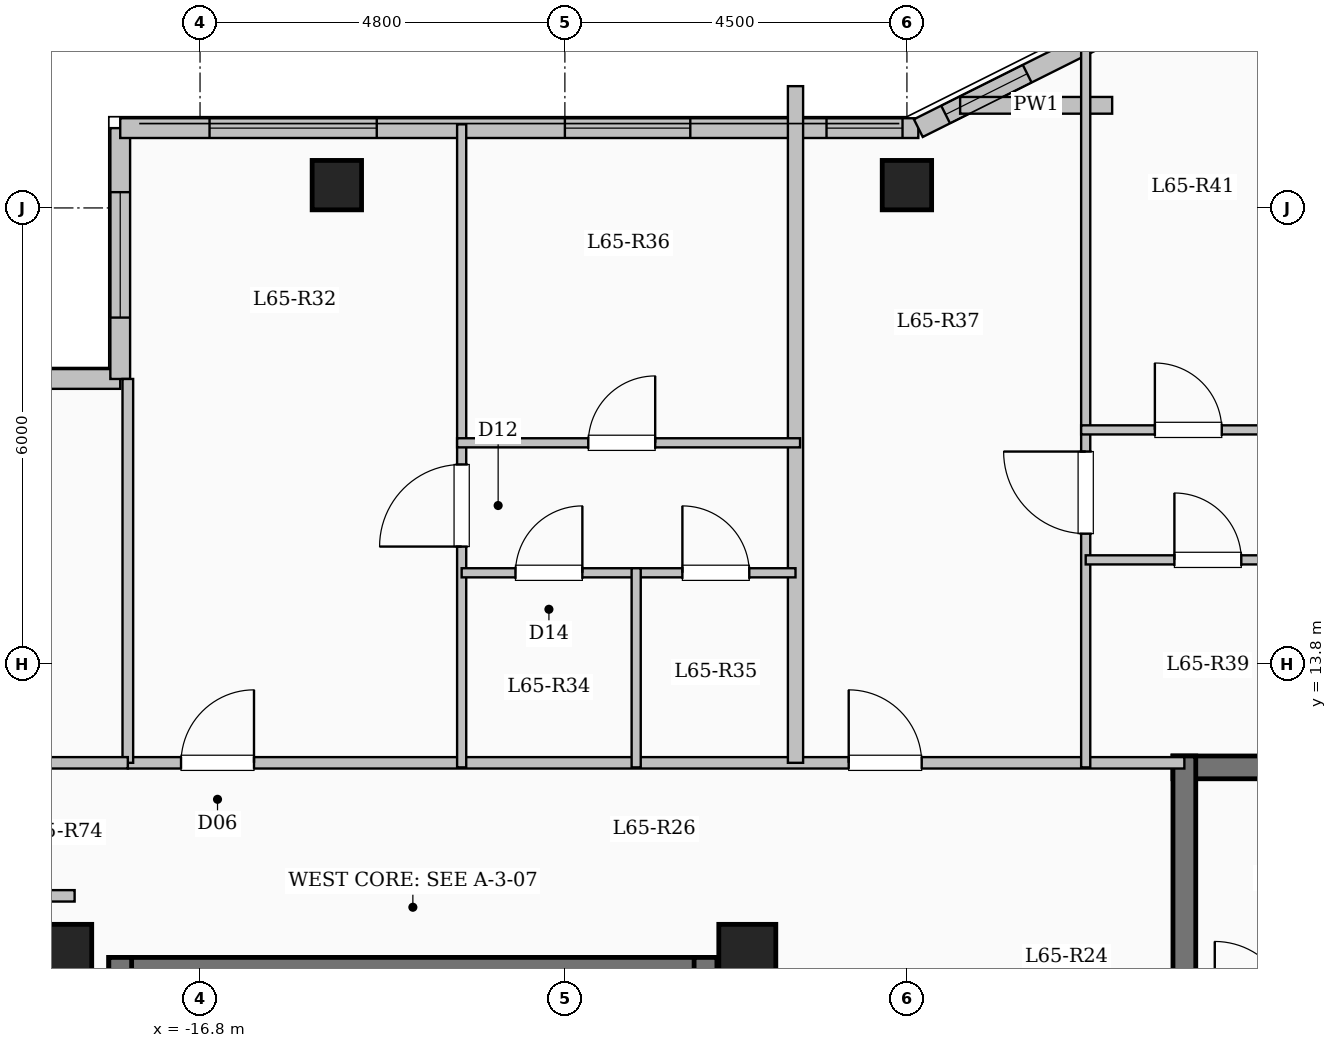
"""IFC4 building model, lengths in metres.
Left out: names, types, materials, properties, quantities, classifications, styles, units other than length and angle.
Written with IfcOpenShell. Run it as: python <this file> out.ifc"""

import sys

from ifc_helpers import new_model, si_unit, direction, frame, frame_2d, origin, origin_2d, place, context, subcontext, project, spatial, rectangle, extrude, element, fill, save


model = new_model("IFC4")
c1 = context("Model", 3, precision=1e-05, world=origin(), true_north=direction((0.0, 1.0)))
c2 = subcontext(c1, "Body", "Model", "MODEL_VIEW")
j1 = project(units=[si_unit("LENGTHUNIT", "METRE"), si_unit("PLANEANGLEUNIT", "RADIAN")], contexts=[c1])
p1 = place(None, origin())
s1 = spatial("IfcSite", under=j1, at=p1, CompositionType="ELEMENT")
p2 = place(p1, origin())
s2 = spatial("IfcBuilding", under=s1, at=p2, CompositionType="ELEMENT")
p3 = place(p2, frame((0.0, 0.0, 241.5)))
s3 = spatial("IfcBuildingStorey", under=s2, at=p3, CompositionType="ELEMENT", Elevation=241.5)
for number, where, z_axis, x_axis in (
    (1, (-9.6, 10.0, 0.0), (0.0, 0.0, 1.0), (1.0, 0.0, 0.0)),
    (2, (-18.6, 10.0, 0.0), (0.0, 0.0, 1.0), (1.0, 0.0, 0.0)),
):
    element("IfcColumn", number, at=place(p3, frame(where, z_axis=z_axis, x_axis=x_axis)), inside=s3, PredefinedType="COLUMN", context=c2, shape_type="SweptSolid", body=[
        extrude(rectangle(XDim=0.75, YDim=0.75, at=origin_2d()), origin(), (0.0, 0.0, 1.0), 3.35),
    ])
for number, where, z_axis, x_axis in (
    (3, (-15.0, 20.1, 0.0), (0.0, 0.0, 1.0), (1.0, 0.0, 0.0)),
    (4, (-7.5, 20.1, 0.0), (0.0, 0.0, 1.0), (1.0, 0.0, 0.0)),
):
    element("IfcColumn", number, at=place(p3, frame(where, z_axis=z_axis, x_axis=x_axis)), inside=s3, PredefinedType="COLUMN", context=c2, shape_type="SweptSolid", body=[
        extrude(rectangle(XDim=0.65, YDim=0.65, at=origin_2d()), origin(), (0.0, 0.0, 1.0), 3.35),
    ])
p4 = place(p3, frame((-22.65, 17.55, 0.0), z_axis=(0.0, 0.0, 1.0), x_axis=(1.0, 0.0, 0.0)))
e5 = element("IfcWall", 5, at=p4, inside=s3, PredefinedType="SOLIDWALL", context=c2, shape_type="SweptSolid", body=[
    extrude(rectangle(XDim=4.8, YDim=0.26, at=frame_2d((2.4, 0.0))), origin(), (0.0, 0.0, 1.0), 3.1),
])
p5 = place(p4, frame((1.425, 0.0, 0.9)))
e6 = element("IfcOpeningElement", 6, at=p5, cuts=e5, PredefinedType="OPENING", context=c2, shape_type="SweptSolid", body=[
    extrude(rectangle(XDim=2.0, YDim=1.7, at=frame_2d((1.0, 0.85))), frame((0.0, 0.14, 0.0), z_axis=(0.0, -1.0, 0.0), x_axis=(1.0, 0.0, 0.0)), (0.0, 0.0, 1.0), 0.28),
])
p6 = place(p3, frame((-17.85, 17.55, 0.0), z_axis=(0.0, 0.0, 1.0), x_axis=(0.0, 1.0, 0.0)))
e7 = element("IfcWall", 7, at=p6, inside=s3, PredefinedType="SOLIDWALL", context=c2, shape_type="SweptSolid", body=[
    extrude(rectangle(XDim=3.3, YDim=0.26, at=frame_2d((1.65, 0.0))), origin(), (0.0, 0.0, 1.0), 3.1),
])
p7 = place(p6, frame((0.808, 0.0, 0.9)))
e8 = element("IfcOpeningElement", 8, at=p7, cuts=e7, PredefinedType="OPENING", context=c2, shape_type="SweptSolid", body=[
    extrude(rectangle(XDim=1.65, YDim=1.6, at=frame_2d((0.825, 0.8))), frame((0.0, 0.14, 0.0), z_axis=(0.0, -1.0, 0.0), x_axis=(1.0, 0.0, 0.0)), (0.0, 0.0, 1.0), 0.28),
])
p8 = place(p3, frame((-17.85, 20.85, 0.0), z_axis=(0.0, 0.0, 1.0), x_axis=(1.0, 0.0, 0.0)))
e9 = element("IfcWall", 9, at=p8, inside=s3, PredefinedType="SOLIDWALL", context=c2, shape_type="SweptSolid", body=[
    extrude(rectangle(XDim=10.5, YDim=0.26, at=frame_2d((5.25, 0.0))), origin(), (0.0, 0.0, 1.0), 3.1),
])
p9 = place(p8, frame((1.175, 0.0, 0.9)))
e10 = element("IfcOpeningElement", 10, at=p9, cuts=e9, PredefinedType="OPENING", context=c2, shape_type="SweptSolid", body=[
    extrude(rectangle(XDim=2.2, YDim=1.75, at=frame_2d((1.1, 0.875))), frame((0.0, 0.14, 0.0), z_axis=(0.0, -1.0, 0.0), x_axis=(1.0, 0.0, 0.0)), (0.0, 0.0, 1.0), 0.28),
])
p10 = place(p8, frame((5.85, 0.0, 0.9)))
e11 = element("IfcOpeningElement", 11, at=p10, cuts=e9, PredefinedType="OPENING", context=c2, shape_type="SweptSolid", body=[
    extrude(rectangle(XDim=1.65, YDim=1.6, at=frame_2d((0.825, 0.8))), frame((0.0, 0.14, 0.0), z_axis=(0.0, -1.0, 0.0), x_axis=(1.0, 0.0, 0.0)), (0.0, 0.0, 1.0), 0.28),
])
p11 = place(p8, frame((9.292, 0.0, 0.95)))
e12 = element("IfcOpeningElement", 12, at=p11, cuts=e9, PredefinedType="OPENING", context=c2, shape_type="SweptSolid", body=[
    extrude(rectangle(XDim=1.0, YDim=1.5, at=frame_2d((0.5, 0.75))), frame((0.0, 0.14, 0.0), z_axis=(0.0, -1.0, 0.0), x_axis=(1.0, 0.0, 0.0)), (0.0, 0.0, 1.0), 0.28),
])
p12 = place(p3, frame((-7.35, 20.85, 0.0), z_axis=(0.0, 0.0, 1.0), x_axis=(0.894427191, 0.4472135955, 0.0)))
e13 = element("IfcWall", 13, at=p12, inside=s3, PredefinedType="SOLIDWALL", context=c2, shape_type="SweptSolid", body=[
    extrude(rectangle(XDim=3.354, YDim=0.26, at=frame_2d((1.677, 0.0))), origin(), (0.0, 0.0, 1.0), 3.1),
])
p13 = place(p12, frame((0.401, 0.0, 0.95)))
e14 = element("IfcOpeningElement", 14, at=p13, cuts=e13, PredefinedType="OPENING", context=c2, shape_type="SweptSolid", body=[
    extrude(rectangle(XDim=1.2, YDim=1.5, at=frame_2d((0.6, 0.75))), frame((0.0, 0.14, 0.0), z_axis=(0.0, -1.0, 0.0), x_axis=(1.0, 0.0, 0.0)), (0.0, 0.0, 1.0), 0.28),
])
p14 = place(p3, frame((-6.8, 21.15, 0.0), z_axis=(0.0, 0.0, 1.0), x_axis=(1.0, 0.0, 0.0)))
e15 = element("IfcWall", 15, at=p14, inside=s3, PredefinedType="PARAPET", context=c2, shape_type="SweptSolid", body=[
    extrude(rectangle(XDim=2.0, YDim=0.22, at=frame_2d((1.0, 0.0))), origin(), (0.0, 0.0, 1.0), 0.85),
])
p15 = place(p3, frame((-18.0, 9.79, 0.0), z_axis=(0.0, 0.0, 1.0), x_axis=(1.0, 0.0, 0.0)))
e16 = element("IfcWall", 16, at=p15, inside=s3, PredefinedType="SHEAR", context=c2, shape_type="SweptSolid", body=[
    extrude(rectangle(XDim=8.0, YDim=0.3, at=frame_2d((4.0, 0.0))), origin(), (0.0, 0.0, 1.0), 3.35),
])
for number, where, z_axis, x_axis in (
    (17, (-17.85, 6.35, 0.0), (0.0, 0.0, 1.0), (0.0, 1.0, 0.0)),
    (18, (-10.15, 6.35, 0.0), (0.0, 0.0, 1.0), (0.0, 1.0, 0.0)),
):
    element("IfcWall", number, at=place(p3, frame(where, z_axis=z_axis, x_axis=x_axis)), inside=s3, PredefinedType="SHEAR", context=c2, shape_type="SweptSolid", body=[
        extrude(rectangle(XDim=3.59, YDim=0.3, at=frame_2d((1.795, 0.0))), origin(), (0.0, 0.0, 1.0), 3.35),
    ])
p16 = place(p3, frame((-4.0, 12.44, 0.0), z_axis=(0.0, 0.0, 1.0), x_axis=(1.0, 0.0, 0.0)))
e19 = element("IfcWall", 19, at=p16, inside=s3, PredefinedType="SHEAR", context=c2, shape_type="SweptSolid", body=[
    extrude(rectangle(XDim=8.0, YDim=0.3, at=frame_2d((4.0, 0.0))), origin(), (0.0, 0.0, 1.0), 3.35),
])
p17 = place(p3, frame((-3.85, 9.0, 0.0), z_axis=(0.0, 0.0, 1.0), x_axis=(0.0, 1.0, 0.0)))
e20 = element("IfcWall", 20, at=p17, inside=s3, PredefinedType="SHEAR", context=c2, shape_type="SweptSolid", body=[
    extrude(rectangle(XDim=3.59, YDim=0.3, at=frame_2d((1.795, 0.0))), origin(), (0.0, 0.0, 1.0), 3.35),
])
p18 = place(p3, frame((-17.75, 12.5, 0.0), z_axis=(0.0, 0.0, 1.0), x_axis=(1.0, 0.0, 0.0)))
e21 = element("IfcWall", 21, at=p18, inside=s3, PredefinedType="PARTITIONING", context=c2, shape_type="SweptSolid", body=[
    extrude(rectangle(XDim=13.9, YDim=0.15, at=frame_2d((6.95, 0.0))), origin(), (0.0, 0.0, 1.0), 3.1),
])
p19 = place(p18, frame((0.7, 0.0, 0.0)))
e22 = element("IfcOpeningElement", 22, at=p19, cuts=e21, PredefinedType="OPENING", context=c2, shape_type="SweptSolid", body=[
    extrude(rectangle(XDim=0.96, YDim=2.15, at=frame_2d((0.48, 1.075))), frame((0.0, 0.085, 0.0), z_axis=(0.0, -1.0, 0.0), x_axis=(1.0, 0.0, 0.0)), (0.0, 0.0, 1.0), 0.17),
])
p20 = place(p18, frame((9.484, 0.0, 0.0)))
e23 = element("IfcOpeningElement", 23, at=p20, cuts=e21, PredefinedType="OPENING", context=c2, shape_type="SweptSolid", body=[
    extrude(rectangle(XDim=0.96, YDim=2.15, at=frame_2d((0.48, 1.075))), frame((0.0, 0.085, 0.0), z_axis=(0.0, -1.0, 0.0), x_axis=(1.0, 0.0, 0.0)), (0.0, 0.0, 1.0), 0.17),
])
p21 = place(p3, frame((-8.966, 12.5, 0.0), z_axis=(0.0, 0.0, 1.0), x_axis=(0.0, 1.0, 0.0)))
e24 = element("IfcWall", 24, at=p21, inside=s3, PredefinedType="SOLIDWALL", context=c2, shape_type="SweptSolid", body=[
    extrude(rectangle(XDim=8.902, YDim=0.2, at=frame_2d((4.451, 0.0))), origin(), (0.0, 0.0, 1.0), 3.1),
])
p22 = place(p3, frame((-13.358, 12.44, 0.0), z_axis=(0.0, 0.0, 1.0), x_axis=(0.0, 1.0, 0.0)))
e25 = element("IfcWall", 25, at=p22, inside=s3, PredefinedType="PARTITIONING", context=c2, shape_type="SweptSolid", body=[
    extrude(rectangle(XDim=8.46, YDim=0.12, at=frame_2d((4.23, 0.0))), origin(), (0.0, 0.0, 1.0), 3.1),
])
p23 = place(p22, frame((2.905, 0.0, 0.0)))
e26 = element("IfcOpeningElement", 26, at=p23, cuts=e25, PredefinedType="OPENING", context=c2, shape_type="SweptSolid", body=[
    extrude(rectangle(XDim=1.08, YDim=2.15, at=frame_2d((0.54, 1.075))), frame((0.0, 0.07, 0.0), z_axis=(0.0, -1.0, 0.0), x_axis=(1.0, 0.0, 0.0)), (0.0, 0.0, 1.0), 0.14),
])
p24 = place(p3, frame((-13.358, 15.0, 0.0), z_axis=(0.0, 0.0, 1.0), x_axis=(1.0, 0.0, 0.0)))
e27 = element("IfcWall", 27, at=p24, inside=s3, PredefinedType="PARTITIONING", context=c2, shape_type="SweptSolid", body=[
    extrude(rectangle(XDim=2.296, YDim=0.12, at=frame_2d((1.148, 0.0))), origin(), (0.0, 0.0, 1.0), 3.1),
])
p25 = place(p24, frame((0.708, 0.0, 0.0)))
e28 = element("IfcOpeningElement", 28, at=p25, cuts=e27, PredefinedType="OPENING", context=c2, shape_type="SweptSolid", body=[
    extrude(rectangle(XDim=0.88, YDim=2.1, at=frame_2d((0.44, 1.05))), frame((0.0, 0.07, 0.0), z_axis=(0.0, -1.0, 0.0), x_axis=(1.0, 0.0, 0.0)), (0.0, 0.0, 1.0), 0.14),
])
p26 = place(p3, frame((-11.062, 15.0, 0.0), z_axis=(0.0, 0.0, 1.0), x_axis=(1.0, 0.0, 0.0)))
e29 = element("IfcWall", 29, at=p26, inside=s3, PredefinedType="PARTITIONING", context=c2, shape_type="SweptSolid", body=[
    extrude(rectangle(XDim=2.096, YDim=0.12, at=frame_2d((1.048, 0.0))), origin(), (0.0, 0.0, 1.0), 3.1),
])
p27 = place(p26, frame((0.608, 0.0, 0.0)))
e30 = element("IfcOpeningElement", 30, at=p27, cuts=e29, PredefinedType="OPENING", context=c2, shape_type="SweptSolid", body=[
    extrude(rectangle(XDim=0.88, YDim=2.1, at=frame_2d((0.44, 1.05))), frame((0.0, 0.07, 0.0), z_axis=(0.0, -1.0, 0.0), x_axis=(1.0, 0.0, 0.0)), (0.0, 0.0, 1.0), 0.14),
])
p28 = place(p3, frame((-13.418, 16.71, 0.0), z_axis=(0.0, 0.0, 1.0), x_axis=(1.0, 0.0, 0.0)))
e31 = element("IfcWall", 31, at=p28, inside=s3, PredefinedType="PARTITIONING", context=c2, shape_type="SweptSolid", body=[
    extrude(rectangle(XDim=4.512, YDim=0.12, at=frame_2d((2.256, 0.0))), origin(), (0.0, 0.0, 1.0), 2.785),
])
p29 = place(p28, frame((1.726, 0.0, 0.0)))
e32 = element("IfcOpeningElement", 32, at=p29, cuts=e31, PredefinedType="OPENING", context=c2, shape_type="SweptSolid", body=[
    extrude(rectangle(XDim=0.88, YDim=2.1, at=frame_2d((0.44, 1.05))), frame((0.0, 0.07, 0.0), z_axis=(0.0, -1.0, 0.0), x_axis=(1.0, 0.0, 0.0)), (0.0, 0.0, 1.0), 0.14),
])
p30 = place(p3, frame((-11.062, 12.44, 0.0), z_axis=(0.0, 0.0, 1.0), x_axis=(0.0, 1.0, 0.0)))
e33 = element("IfcWall", 33, at=p30, inside=s3, PredefinedType="PARTITIONING", context=c2, shape_type="SweptSolid", body=[
    extrude(rectangle(XDim=2.62, YDim=0.12, at=frame_2d((1.31, 0.0))), origin(), (0.0, 0.0, 1.0), 3.1),
])
p31 = place(p3, frame((-5.148, 12.44, 0.0), z_axis=(0.0, 0.0, 1.0), x_axis=(0.0, 1.0, 0.0)))
e34 = element("IfcWall", 34, at=p31, inside=s3, PredefinedType="PARTITIONING", context=c2, shape_type="SweptSolid", body=[
    extrude(rectangle(XDim=9.903, YDim=0.12, at=frame_2d((4.952, 0.0))), origin(), (0.0, 0.0, 1.0), 3.1),
])
p32 = place(p31, frame((3.075, 0.0, 0.0)))
e35 = element("IfcOpeningElement", 35, at=p32, cuts=e34, PredefinedType="OPENING", context=c2, shape_type="SweptSolid", body=[
    extrude(rectangle(XDim=1.08, YDim=2.15, at=frame_2d((0.54, 1.075))), frame((0.0, 0.07, 0.0), z_axis=(0.0, -1.0, 0.0), x_axis=(1.0, 0.0, 0.0)), (0.0, 0.0, 1.0), 0.14),
])
p33 = place(p3, frame((-5.148, 15.17, 0.0), z_axis=(0.0, 0.0, 1.0), x_axis=(1.0, 0.0, 0.0)))
e36 = element("IfcWall", 36, at=p33, inside=s3, PredefinedType="PARTITIONING", context=c2, shape_type="SweptSolid", body=[
    extrude(rectangle(XDim=3.214, YDim=0.12, at=frame_2d((1.607, 0.0))), origin(), (0.0, 0.0, 1.0), 3.1),
])
p34 = place(p33, frame((1.167, 0.0, 0.0)))
e37 = element("IfcOpeningElement", 37, at=p34, cuts=e36, PredefinedType="OPENING", context=c2, shape_type="SweptSolid", body=[
    extrude(rectangle(XDim=0.88, YDim=2.1, at=frame_2d((0.44, 1.05))), frame((0.0, 0.07, 0.0), z_axis=(0.0, -1.0, 0.0), x_axis=(1.0, 0.0, 0.0)), (0.0, 0.0, 1.0), 0.14),
])
p35 = place(p3, frame((-5.208, 16.88, 0.0), z_axis=(0.0, 0.0, 1.0), x_axis=(1.0, 0.0, 0.0)))
e38 = element("IfcWall", 38, at=p35, inside=s3, PredefinedType="PARTITIONING", context=c2, shape_type="SweptSolid", body=[
    extrude(rectangle(XDim=5.818, YDim=0.12, at=frame_2d((2.909, 0.0))), origin(), (0.0, 0.0, 1.0), 2.785),
])
p36 = place(p35, frame((0.97, 0.0, 0.0)))
e39 = element("IfcOpeningElement", 39, at=p36, cuts=e38, PredefinedType="OPENING", context=c2, shape_type="SweptSolid", body=[
    extrude(rectangle(XDim=0.88, YDim=2.1, at=frame_2d((0.44, 1.05))), frame((0.0, 0.07, 0.0), z_axis=(0.0, -1.0, 0.0), x_axis=(1.0, 0.0, 0.0)), (0.0, 0.0, 1.0), 0.14),
])
p37 = place(p35, frame((3.788, 0.0, 0.0)))
e40 = element("IfcOpeningElement", 40, at=p37, cuts=e38, PredefinedType="OPENING", context=c2, shape_type="SweptSolid", body=[
    extrude(rectangle(XDim=0.88, YDim=2.1, at=frame_2d((0.44, 1.05))), frame((0.0, 0.07, 0.0), z_axis=(0.0, -1.0, 0.0), x_axis=(1.0, 0.0, 0.0)), (0.0, 0.0, 1.0), 0.14),
])
p38 = place(p3, frame((-22.68, 10.75, 0.0), z_axis=(0.0, 0.0, 1.0), x_axis=(1.0, 0.0, 0.0)))
e41 = element("IfcWall", 41, at=p38, inside=s3, PredefinedType="PARTITIONING", context=c2, shape_type="SweptSolid", body=[
    extrude(rectangle(XDim=4.23, YDim=0.15, at=frame_2d((2.115, 0.0))), origin(), (0.0, 0.0, 1.0), 3.1),
])
p39 = place(p3, frame((-17.75, 12.5, 0.0), z_axis=(0.0, 0.0, 1.0), x_axis=(0.0, 1.0, 0.0)))
e42 = element("IfcWall", 42, at=p39, inside=s3, PredefinedType="PARTITIONING", context=c2, shape_type="SweptSolid", body=[
    extrude(rectangle(XDim=5.05, YDim=0.14, at=frame_2d((2.525, 0.0))), origin(), (0.0, 0.0, 1.0), 3.1),
])
p40 = place(p3, frame((-22.68, 12.5, 0.0), z_axis=(0.0, 0.0, 1.0), x_axis=(1.0, 0.0, 0.0)))
e43 = element("IfcWall", 43, at=p40, inside=s3, PredefinedType="PARTITIONING", context=c2, shape_type="SweptSolid", body=[
    extrude(rectangle(XDim=4.93, YDim=0.15, at=frame_2d((2.465, 0.0))), origin(), (0.0, 0.0, 1.0), 3.1),
])
p41 = place(p40, frame((1.99, 0.0, 0.0)))
e44 = element("IfcOpeningElement", 44, at=p41, cuts=e43, PredefinedType="OPENING", context=c2, shape_type="SweptSolid", body=[
    extrude(rectangle(XDim=0.95, YDim=2.15, at=frame_2d((0.475, 1.075))), frame((0.0, 0.085, 0.0), z_axis=(0.0, -1.0, 0.0), x_axis=(1.0, 0.0, 0.0)), (0.0, 0.0, 1.0), 0.17),
])
p42 = place(p7, origin())
e45 = element("IfcWindow", 45, at=p42, inside=s3, PartitioningType="SINGLE_PANEL", PredefinedType="WINDOW", context=c2, shape_type="SweptSolid", body=[
    extrude(rectangle(XDim=1.65, YDim=1.6, at=frame_2d((0.825, 0.8))), frame((0.0, 0.03, 0.0), z_axis=(0.0, -1.0, 0.0), x_axis=(1.0, 0.0, 0.0)), (0.0, 0.0, 1.0), 0.06),
])
fill(e8, e45)
p43 = place(p9, origin())
e46 = element("IfcWindow", 46, at=p43, inside=s3, PartitioningType="SINGLE_PANEL", PredefinedType="WINDOW", context=c2, shape_type="SweptSolid", body=[
    extrude(rectangle(XDim=2.2, YDim=1.75, at=frame_2d((1.1, 0.875))), frame((0.0, 0.03, 0.0), z_axis=(0.0, -1.0, 0.0), x_axis=(1.0, 0.0, 0.0)), (0.0, 0.0, 1.0), 0.06),
])
fill(e10, e46)
p44 = place(p10, origin())
e47 = element("IfcWindow", 47, at=p44, inside=s3, PartitioningType="SINGLE_PANEL", PredefinedType="WINDOW", context=c2, shape_type="SweptSolid", body=[
    extrude(rectangle(XDim=1.65, YDim=1.6, at=frame_2d((0.825, 0.8))), frame((0.0, 0.03, 0.0), z_axis=(0.0, -1.0, 0.0), x_axis=(1.0, 0.0, 0.0)), (0.0, 0.0, 1.0), 0.06),
])
fill(e11, e47)
p45 = place(p11, origin())
e48 = element("IfcWindow", 48, at=p45, inside=s3, PartitioningType="SINGLE_PANEL", PredefinedType="WINDOW", context=c2, shape_type="SweptSolid", body=[
    extrude(rectangle(XDim=1.0, YDim=1.5, at=frame_2d((0.5, 0.75))), frame((0.0, 0.03, 0.0), z_axis=(0.0, -1.0, 0.0), x_axis=(1.0, 0.0, 0.0)), (0.0, 0.0, 1.0), 0.06),
])
fill(e12, e48)
p46 = place(p13, origin())
e49 = element("IfcWindow", 49, at=p46, inside=s3, PartitioningType="SINGLE_PANEL", PredefinedType="WINDOW", context=c2, shape_type="SweptSolid", body=[
    extrude(rectangle(XDim=1.2, YDim=1.5, at=frame_2d((0.6, 0.75))), frame((0.0, 0.03, 0.0), z_axis=(0.0, -1.0, 0.0), x_axis=(1.0, 0.0, 0.0)), (0.0, 0.0, 1.0), 0.06),
])
fill(e14, e49)
p47 = place(p19, origin())
e50 = element("IfcDoor", 50, at=p47, inside=s3, OperationType="SINGLE_SWING_RIGHT", PredefinedType="DOOR", context=c2, shape_type="SweptSolid", body=[
    extrude(rectangle(XDim=0.96, YDim=2.15, at=frame_2d((0.48, 1.075))), frame((0.0, 0.025, 0.0), z_axis=(0.0, -1.0, 0.0), x_axis=(1.0, 0.0, 0.0)), (0.0, 0.0, 1.0), 0.05),
])
fill(e22, e50)
p48 = place(p23, origin())
e51 = element("IfcDoor", 51, at=p48, inside=s3, OperationType="SINGLE_SWING_LEFT", PredefinedType="DOOR", context=c2, shape_type="SweptSolid", body=[
    extrude(rectangle(XDim=1.08, YDim=2.15, at=frame_2d((0.54, 1.075))), frame((0.0, 0.025, 0.0), z_axis=(0.0, -1.0, 0.0), x_axis=(1.0, 0.0, 0.0)), (0.0, 0.0, 1.0), 0.05),
])
fill(e26, e51)
p49 = place(p25, origin())
e52 = element("IfcDoor", 52, at=p49, inside=s3, OperationType="SINGLE_SWING_RIGHT", PredefinedType="DOOR", context=c2, shape_type="SweptSolid", body=[
    extrude(rectangle(XDim=0.88, YDim=2.1, at=frame_2d((0.44, 1.05))), frame((0.0, 0.025, 0.0), z_axis=(0.0, -1.0, 0.0), x_axis=(1.0, 0.0, 0.0)), (0.0, 0.0, 1.0), 0.05),
])
fill(e28, e52)
p50 = place(p27, origin())
e53 = element("IfcDoor", 53, at=p50, inside=s3, OperationType="SINGLE_SWING_LEFT", PredefinedType="DOOR", context=c2, shape_type="SweptSolid", body=[
    extrude(rectangle(XDim=0.88, YDim=2.1, at=frame_2d((0.44, 1.05))), frame((0.0, 0.025, 0.0), z_axis=(0.0, -1.0, 0.0), x_axis=(1.0, 0.0, 0.0)), (0.0, 0.0, 1.0), 0.05),
])
fill(e30, e53)
p51 = place(p29, origin())
e54 = element("IfcDoor", 54, at=p51, inside=s3, OperationType="SINGLE_SWING_RIGHT", PredefinedType="DOOR", context=c2, shape_type="SweptSolid", body=[
    extrude(rectangle(XDim=0.88, YDim=2.1, at=frame_2d((0.44, 1.05))), frame((0.0, 0.025, 0.0), z_axis=(0.0, -1.0, 0.0), x_axis=(1.0, 0.0, 0.0)), (0.0, 0.0, 1.0), 0.05),
])
fill(e32, e54)
p52 = place(p20, origin())
e55 = element("IfcDoor", 55, at=p52, inside=s3, OperationType="SINGLE_SWING_LEFT", PredefinedType="DOOR", context=c2, shape_type="SweptSolid", body=[
    extrude(rectangle(XDim=0.96, YDim=2.15, at=frame_2d((0.48, 1.075))), frame((0.0, 0.025, 0.0), z_axis=(0.0, -1.0, 0.0), x_axis=(1.0, 0.0, 0.0)), (0.0, 0.0, 1.0), 0.05),
])
fill(e23, e55)
p53 = place(p32, origin())
e56 = element("IfcDoor", 56, at=p53, inside=s3, OperationType="SINGLE_SWING_RIGHT", PredefinedType="DOOR", context=c2, shape_type="SweptSolid", body=[
    extrude(rectangle(XDim=1.08, YDim=2.15, at=frame_2d((0.54, 1.075))), frame((0.0, 0.025, 0.0), z_axis=(0.0, -1.0, 0.0), x_axis=(1.0, 0.0, 0.0)), (0.0, 0.0, 1.0), 0.05),
])
fill(e35, e56)
p54 = place(p34, origin())
e57 = element("IfcDoor", 57, at=p54, inside=s3, OperationType="SINGLE_SWING_LEFT", PredefinedType="DOOR", context=c2, shape_type="SweptSolid", body=[
    extrude(rectangle(XDim=0.88, YDim=2.1, at=frame_2d((0.44, 1.05))), frame((0.0, 0.025, 0.0), z_axis=(0.0, -1.0, 0.0), x_axis=(1.0, 0.0, 0.0)), (0.0, 0.0, 1.0), 0.05),
])
fill(e37, e57)
p55 = place(p36, origin())
e58 = element("IfcDoor", 58, at=p55, inside=s3, OperationType="SINGLE_SWING_LEFT", PredefinedType="DOOR", context=c2, shape_type="SweptSolid", body=[
    extrude(rectangle(XDim=0.88, YDim=2.1, at=frame_2d((0.44, 1.05))), frame((0.0, 0.025, 0.0), z_axis=(0.0, -1.0, 0.0), x_axis=(1.0, 0.0, 0.0)), (0.0, 0.0, 1.0), 0.05),
])
fill(e39, e58)
save(model, sys.argv[1])
